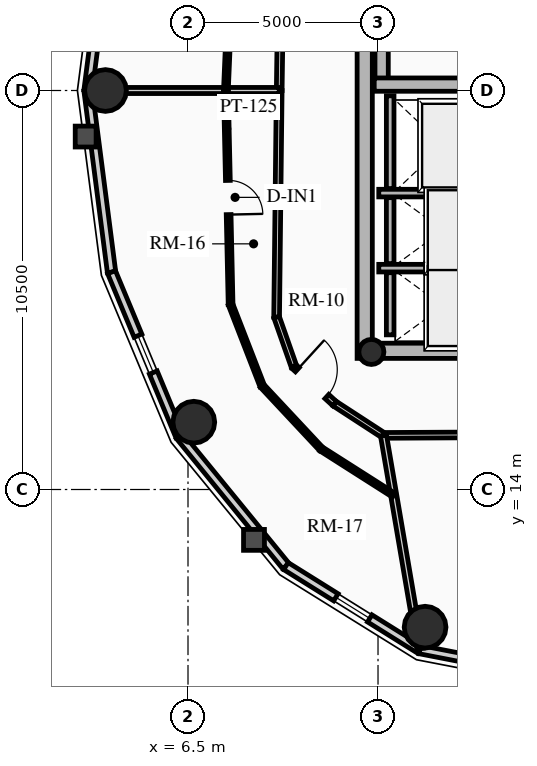
"""IFC4 building model, lengths in metres.
Left out: names, types, materials, properties, quantities, classifications, styles, units other than length and angle.
Written with IfcOpenShell. Run it as: python <this file> out.ifc"""

import sys

from ifc_helpers import new_model, si_unit, direction, frame, frame_2d, origin, origin_2d, place, context, subcontext, project, spatial, rectangle, circle, hollow_circle, extrude, source, transform, mapped, element, fill, save


model = new_model("IFC4")
c1 = context("Model", 3, precision=1e-05, world=origin(), true_north=direction((0.0, 1.0)))
c2 = subcontext(c1, "Body", "Model", "MODEL_VIEW")
j1 = project(units=[si_unit("LENGTHUNIT", "METRE"), si_unit("PLANEANGLEUNIT", "RADIAN")], contexts=[c1])
p1 = place(None, origin())
s1 = spatial("IfcSite", under=j1, at=p1, CompositionType="ELEMENT")
p2 = place(p1, origin())
s2 = spatial("IfcBuilding", under=s1, at=p2, CompositionType="ELEMENT")
p3 = place(p2, frame((0.0, 0.0, 222.85)))
s3 = spatial("IfcBuildingStorey", under=s2, at=p3, CompositionType="ELEMENT", Elevation=222.85)
p4 = place(p3, frame((11.15, 17.45, 0.0), z_axis=(0.0, 0.0, 1.0), x_axis=(0.0, 1.0, 0.0)))
e1 = element("IfcWall", 1, at=p4, inside=s3, PredefinedType="SHEAR", context=c2, shape_type="SweptSolid", body=[
    extrude(rectangle(XDim=14.1, YDim=0.4, at=frame_2d((7.05, 0.0))), origin(), (0.0, 0.0, 1.0), 3.2),
])
p5 = place(p3, frame((11.15, 17.65, 0.0), z_axis=(0.0, 0.0, 1.0), x_axis=(1.0, 0.0, 0.0)))
e2 = element("IfcWall", 2, at=p5, inside=s3, PredefinedType="SHEAR", context=c2, shape_type="SweptSolid", body=[
    extrude(rectangle(XDim=10.7, YDim=0.4, at=frame_2d((5.35, 0.0))), origin(), (0.0, 0.0, 1.0), 3.2),
])
m1 = source(origin(), c2, "Body", "SweptSolid", [
    extrude(rectangle(XDim=1.5, YDim=2.02, at=frame_2d((0.75, 1.01))), frame((0.0, 0.21, 0.0), z_axis=(0.0, -1.0, 0.0), x_axis=(1.0, 0.0, 0.0)), (0.0, 0.0, 1.0), 0.42),
])
p6 = place(p5, frame((5.45, 0.0, 0.0)))
e3 = element("IfcOpeningElement", 3, at=p6, cuts=e2, PredefinedType="OPENING", context=c2, shape_type="MappedRepresentation", body=[
    mapped(m1, transform((0.0, 0.0, 0.0), x_axis=(1.0, 0.0, 0.0), y_axis=(0.0, 1.0, 0.0), z_axis=(0.0, 0.0, 1.0), scale=1.0)),
])
p7 = place(p3, frame((11.595, 24.655, 0.0), z_axis=(0.0, 0.0, 1.0), x_axis=(0.0, 1.0, 0.0)))
e4 = element("IfcWall", 4, at=p7, inside=s3, PredefinedType="SHEAR", context=c2, shape_type="SweptSolid", body=[
    extrude(rectangle(XDim=6.695, YDim=0.35, at=frame_2d((3.348, 0.0))), origin(), (0.0, 0.0, 1.0), 3.2),
])
p8 = place(p3, frame((11.4, 24.655, 0.0), z_axis=(0.0, 0.0, 1.0), x_axis=(1.0, 0.0, 0.0)))
e5 = element("IfcWall", 5, at=p8, inside=s3, PredefinedType="SHEAR", context=c2, shape_type="SweptSolid", body=[
    extrude(rectangle(XDim=3.285, YDim=0.35, at=frame_2d((1.643, 0.0))), origin(), (0.0, 0.0, 1.0), 3.2),
])
p9 = place(p3, frame((11.325, 17.62, 0.0), z_axis=(0.0, 0.0, 1.0), x_axis=(1.0, 0.0, 0.0)))
e6 = element("IfcColumn", 6, at=p9, inside=s3, PredefinedType="COLUMN", context=c2, shape_type="SweptSolid", body=[
    extrude(hollow_circle(Radius=0.33, WallThickness=0.025, at=origin_2d()), origin(), (0.0, 0.0, 1.0), 3.2),
])
for number, where, z_axis, x_axis in (
    (7, (4.328, 24.5, 0.0), (0.0, 0.0, 1.0), (1.0, 0.0, 0.0)),
    (8, (6.653, 15.771, 0.0), (0.0, 0.0, 1.0), (1.0, 0.0, 0.0)),
    (9, (12.739, 10.377, 0.0), (0.0, 0.0, 1.0), (1.0, 0.0, 0.0)),
):
    element("IfcColumn", number, at=place(p3, frame(where, z_axis=z_axis, x_axis=x_axis)), inside=s3, PredefinedType="USERDEFINED", context=c2, shape_type="SweptSolid", body=[
        extrude(circle(Radius=0.55, at=origin_2d()), origin(), (0.0, 0.0, 1.0), 3.2),
    ])
p10 = place(p3, frame((3.87, 24.5, 0.0), z_axis=(0.0, 0.0, 1.0), x_axis=(0.128241318541, 0.991742993027, 0.0)))
e10 = element("IfcWall", 10, at=p10, inside=s3, PredefinedType="SOLIDWALL", context=c2, shape_type="SweptSolid", body=[
    extrude(rectangle(XDim=4.82, YDim=0.22, at=frame_2d((2.41, 0.0))), origin(), (0.0, 0.0, 1.0), 2.612),
])
m2 = source(origin(), c2, "Body", "SweptSolid", [
    extrude(rectangle(XDim=1.05, YDim=1.3, at=frame_2d((0.525, 0.65))), frame((0.0, 0.12, 0.0), z_axis=(0.0, -1.0, 0.0), x_axis=(1.0, 0.0, 0.0)), (0.0, 0.0, 1.0), 0.24),
])
p11 = place(p10, frame((1.885, 0.0, 0.65)))
e11 = element("IfcOpeningElement", 11, at=p11, cuts=e10, PredefinedType="OPENING", context=c2, shape_type="MappedRepresentation", body=[
    mapped(m2, transform((0.0, 0.0, 0.0), x_axis=(1.0, 0.0, 0.0), y_axis=(0.0, 1.0, 0.0), z_axis=(0.0, 0.0, 1.0), scale=1.0)),
])
p12 = place(p3, frame((4.488, 19.719, 0.0), z_axis=(0.0, 0.0, 1.0), x_axis=(-0.128241318541, 0.991742993027, 0.0)))
e12 = element("IfcWall", 12, at=p12, inside=s3, PredefinedType="SOLIDWALL", context=c2, shape_type="SweptSolid", body=[
    extrude(rectangle(XDim=4.82, YDim=0.22, at=frame_2d((2.41, 0.0))), origin(), (0.0, 0.0, 1.0), 2.612),
])
p13 = place(p3, frame((6.282, 15.407, 0.0), z_axis=(0.0, 0.0, 1.0), x_axis=(-0.384036305194, 0.923317993052, 0.0)))
e13 = element("IfcWall", 13, at=p13, inside=s3, PredefinedType="SOLIDWALL", context=c2, shape_type="SweptSolid", body=[
    extrude(rectangle(XDim=4.671, YDim=0.22, at=frame_2d((2.335, 0.0))), origin(), (0.0, 0.0, 1.0), 2.612),
])
p14 = place(p13, frame((1.81, 0.0, 0.65)))
e14 = element("IfcOpeningElement", 14, at=p14, cuts=e13, PredefinedType="OPENING", context=c2, shape_type="MappedRepresentation", body=[
    mapped(m2, transform((0.0, 0.0, 0.0), x_axis=(1.0, 0.0, 0.0), y_axis=(0.0, 1.0, 0.0), z_axis=(0.0, 0.0, 1.0), scale=1.0)),
])
p15 = place(p3, frame((9.076, 11.985, 0.0), z_axis=(0.0, 0.0, 1.0), x_axis=(-0.632467166636, 0.774587169483, 0.0)))
e15 = element("IfcWall", 15, at=p15, inside=s3, PredefinedType="SOLIDWALL", context=c2, shape_type="SweptSolid", body=[
    extrude(rectangle(XDim=4.418, YDim=0.22, at=frame_2d((2.209, 0.0))), origin(), (0.0, 0.0, 1.0), 2.612),
])
p16 = place(p3, frame((12.597, 9.787, 0.0), z_axis=(0.0, 0.0, 1.0), x_axis=(-0.848318713376, 0.529485939886, 0.0)))
e16 = element("IfcWall", 16, at=p16, inside=s3, PredefinedType="SOLIDWALL", context=c2, shape_type="SweptSolid", body=[
    extrude(rectangle(XDim=4.15, YDim=0.22, at=frame_2d((2.075, 0.0))), origin(), (0.0, 0.0, 1.0), 2.612),
])
p17 = place(p16, frame((1.55, 0.0, 0.65)))
e17 = element("IfcOpeningElement", 17, at=p17, cuts=e16, PredefinedType="OPENING", context=c2, shape_type="MappedRepresentation", body=[
    mapped(m2, transform((0.0, 0.0, 0.0), x_axis=(1.0, 0.0, 0.0), y_axis=(0.0, 1.0, 0.0), z_axis=(0.0, 0.0, 1.0), scale=1.0)),
])
p18 = place(p3, frame((16.5, 9.03, 0.0), z_axis=(0.0, 0.0, 1.0), x_axis=(-0.981700307484, 0.190432419211, 0.0)))
e18 = element("IfcWall", 18, at=p18, inside=s3, PredefinedType="SOLIDWALL", context=c2, shape_type="SweptSolid", body=[
    extrude(rectangle(XDim=3.976, YDim=0.22, at=frame_2d((1.988, 0.0))), origin(), (0.0, 0.0, 1.0), 2.612),
])
p19 = place(p18, frame((1.463, 0.0, 0.65)))
e19 = element("IfcOpeningElement", 19, at=p19, cuts=e18, PredefinedType="OPENING", context=c2, shape_type="MappedRepresentation", body=[
    mapped(m2, transform((0.0, 0.0, 0.0), x_axis=(1.0, 0.0, 0.0), y_axis=(0.0, 1.0, 0.0), z_axis=(0.0, 0.0, 1.0), scale=1.0)),
])
p20 = place(p3, frame((11.52, 21.8, 0.0), z_axis=(0.0, 0.0, 1.0), x_axis=(1.0, 0.0, 0.0)))
e20 = element("IfcWall", 20, at=p20, inside=s3, PredefinedType="SHEAR", context=c2, shape_type="SweptSolid", body=[
    extrude(rectangle(XDim=2.97, YDim=0.2, at=frame_2d((1.485, 0.0))), origin(), (0.0, 0.0, 1.0), 3.2),
])
p21 = place(p3, frame((11.82, 21.92, 0.0), z_axis=(0.0, 0.0, 1.0), x_axis=(0.0, 1.0, 0.0)))
e21 = element("IfcWall", 21, at=p21, inside=s3, PredefinedType="SHEAR", context=c2, shape_type="SweptSolid", body=[
    extrude(rectangle(XDim=2.44, YDim=0.2, at=frame_2d((1.22, 0.0))), origin(), (0.0, 0.0, 1.0), 3.2),
])
p22 = place(p3, frame((11.52, 19.825, 0.0), z_axis=(0.0, 0.0, 1.0), x_axis=(1.0, 0.0, 0.0)))
e22 = element("IfcWall", 22, at=p22, inside=s3, PredefinedType="SHEAR", context=c2, shape_type="SweptSolid", body=[
    extrude(rectangle(XDim=2.97, YDim=0.2, at=frame_2d((1.485, 0.0))), origin(), (0.0, 0.0, 1.0), 3.2),
])
p23 = place(p3, frame((11.82, 19.945, 0.0), z_axis=(0.0, 0.0, 1.0), x_axis=(0.0, 1.0, 0.0)))
e23 = element("IfcWall", 23, at=p23, inside=s3, PredefinedType="SHEAR", context=c2, shape_type="SweptSolid", body=[
    extrude(rectangle(XDim=1.735, YDim=0.2, at=frame_2d((0.867, 0.0))), origin(), (0.0, 0.0, 1.0), 3.2),
])
p24 = place(p3, frame((11.82, 18.07, 0.0), z_axis=(0.0, 0.0, 1.0), x_axis=(0.0, 1.0, 0.0)))
e24 = element("IfcWall", 24, at=p24, inside=s3, PredefinedType="SHEAR", context=c2, shape_type="SweptSolid", body=[
    extrude(rectangle(XDim=1.635, YDim=0.2, at=frame_2d((0.817, 0.0))), origin(), (0.0, 0.0, 1.0), 3.2),
])
p25 = place(p3, frame((8.986, 30.349, 0.0), z_axis=(0.0, 0.0, 1.0), x_axis=(-0.014775478218, -0.999890836663, 0.0)))
e25 = element("IfcWall", 25, at=p25, inside=s3, PredefinedType="PARTITIONING", context=c2, shape_type="SweptSolid", body=[
    extrude(rectangle(XDim=5.849, YDim=0.15, at=frame_2d((2.925, 0.0))), origin(), (0.0, 0.0, 1.0), 2.975),
])
p26 = place(p3, frame((8.9, 24.5, 0.0), z_axis=(0.0, 0.0, 1.0), x_axis=(-0.011416369353, -0.999934831132, 0.0)))
e26 = element("IfcWall", 26, at=p26, inside=s3, PredefinedType="PARTITIONING", context=c2, shape_type="SweptSolid", body=[
    extrude(rectangle(XDim=5.967, YDim=0.15, at=frame_2d((2.983, 0.0))), origin(), (0.0, 0.0, 1.0), 2.612),
])
p27 = place(p3, frame((8.832, 18.534, 0.0), z_axis=(0.0, 0.0, 1.0), x_axis=(0.332031819657, -0.943268186008, 0.0)))
e27 = element("IfcWall", 27, at=p27, inside=s3, PredefinedType="PARTITIONING", context=c2, shape_type="SweptSolid", body=[
    extrude(rectangle(XDim=1.377, YDim=0.15, at=frame_2d((0.688, 0.0))), origin(), (0.0, 0.0, 1.0), 2.545),
])
p28 = place(p3, frame((9.289, 17.235, 0.0), z_axis=(0.0, 0.0, 1.0), x_axis=(0.739015164946, -0.673688790155, 0.0)))
e28 = element("IfcWall", 28, at=p28, inside=s3, PredefinedType="PARTITIONING", context=c2, shape_type="SweptSolid", body=[
    extrude(rectangle(XDim=1.446, YDim=0.15, at=frame_2d((0.723, 0.0))), origin(), (0.0, 0.0, 1.0), 2.612),
])
m3 = source(origin(), c2, "Body", "SweptSolid", [
    extrude(rectangle(XDim=1.05, YDim=2.015, at=frame_2d((0.525, 1.007))), frame((0.0, 0.085, 0.0), z_axis=(0.0, -1.0, 0.0), x_axis=(1.0, 0.0, 0.0)), (0.0, 0.0, 1.0), 0.17),
])
p29 = place(p28, frame((0.12, 0.0, 0.0)))
e29 = element("IfcOpeningElement", 29, at=p29, cuts=e28, PredefinedType="OPENING", context=c2, shape_type="MappedRepresentation", body=[
    mapped(m3, transform((0.0, 0.0, 0.0), x_axis=(1.0, 0.0, 0.0), y_axis=(0.0, 1.0, 0.0), z_axis=(0.0, 0.0, 1.0), scale=1.0)),
])
p30 = place(p3, frame((10.358, 16.26, 0.0), z_axis=(0.0, 0.0, 1.0), x_axis=(0.838265397059, -0.545262435983, 0.0)))
e30 = element("IfcWall", 30, at=p30, inside=s3, PredefinedType="PARTITIONING", context=c2, shape_type="SweptSolid", body=[
    extrude(rectangle(XDim=1.534, YDim=0.15, at=frame_2d((0.767, 0.0))), origin(), (0.0, 0.0, 1.0), 2.545),
])
p31 = place(p3, frame((11.644, 15.424, 0.0), z_axis=(0.0, 0.0, 1.0), x_axis=(0.999986552511, 0.005186019339, 0.0)))
e31 = element("IfcWall", 31, at=p31, inside=s3, PredefinedType="PARTITIONING", context=c2, shape_type="SweptSolid", body=[
    extrude(rectangle(XDim=3.201, YDim=0.15, at=frame_2d((1.601, 0.0))), origin(), (0.0, 0.0, 1.0), 2.612),
])
p32 = place(p3, frame((8.9, 24.5, 0.0), z_axis=(0.0, 0.0, 1.0), x_axis=(-1.0, 0.0, 0.0)))
e32 = element("IfcWall", 32, at=p32, inside=s3, PredefinedType="PARTITIONING", context=c2, shape_type="SweptSolid", body=[
    extrude(rectangle(XDim=5.01, YDim=0.16, at=frame_2d((2.505, 0.0))), origin(), (0.0, 0.0, 1.0), 2.612),
])
p33 = place(p3, frame((11.644, 15.424, 0.0), z_axis=(0.0, 0.0, 1.0), x_axis=(0.168350269159, -0.985727237563, 0.0)))
e33 = element("IfcWall", 33, at=p33, inside=s3, PredefinedType="PARTITIONING", context=c2, shape_type="SweptSolid", body=[
    extrude(rectangle(XDim=5.699, YDim=0.16, at=frame_2d((2.85, 0.0))), origin(), (0.0, 0.0, 1.0), 2.612),
])
p34 = place(p3, frame((7.732, 30.048, 0.0), z_axis=(0.0, 0.0, 1.0), x_axis=(-0.042296211955, -0.999105114817, 0.0)))
e34 = element("IfcWall", 34, at=p34, inside=s3, PredefinedType="PARTITIONING", context=c2, shape_type="SweptSolid", body=[
    extrude(rectangle(XDim=5.553, YDim=0.125, at=frame_2d((2.776, 0.0))), origin(), (0.0, 0.0, 1.0), 2.975),
])
m4 = source(origin(), c2, "Body", "SweptSolid", [
    extrude(rectangle(XDim=0.9, YDim=2.005, at=frame_2d((0.45, 1.002))), frame((0.0, 0.073, 0.0), z_axis=(0.0, -1.0, 0.0), x_axis=(1.0, 0.0, 0.0)), (0.0, 0.0, 1.0), 0.145),
])
p35 = place(p34, frame((2.326, 0.0, 0.0)))
e35 = element("IfcOpeningElement", 35, at=p35, cuts=e34, PredefinedType="OPENING", context=c2, shape_type="MappedRepresentation", body=[
    mapped(m4, transform((0.0, 0.0, 0.0), x_axis=(1.0, 0.0, 0.0), y_axis=(0.0, 1.0, 0.0), z_axis=(0.0, 0.0, 1.0), scale=1.0)),
])
p36 = place(p3, frame((7.497, 24.5, 0.0), z_axis=(0.0, 0.0, 1.0), x_axis=(0.021927972859, -0.999759553096, 0.0)))
e36 = element("IfcWall", 36, at=p36, inside=s3, PredefinedType="PARTITIONING", context=c2, shape_type="SweptSolid", body=[
    extrude(rectangle(XDim=5.634, YDim=0.125, at=frame_2d((2.817, 0.0))), origin(), (0.0, 0.0, 1.0), 2.612),
])
p37 = place(p36, frame((2.367, 0.0, 0.0)))
e37 = element("IfcOpeningElement", 37, at=p37, cuts=e36, PredefinedType="OPENING", context=c2, shape_type="MappedRepresentation", body=[
    mapped(m4, transform((0.0, 0.0, 0.0), x_axis=(1.0, 0.0, 0.0), y_axis=(0.0, 1.0, 0.0), z_axis=(0.0, 0.0, 1.0), scale=1.0)),
])
p38 = place(p3, frame((7.621, 18.868, 0.0), z_axis=(0.0, 0.0, 1.0), x_axis=(0.361712646649, -0.93228963378, 0.0)))
e38 = element("IfcWall", 38, at=p38, inside=s3, PredefinedType="PARTITIONING", context=c2, shape_type="SweptSolid", body=[
    extrude(rectangle(XDim=2.297, YDim=0.125, at=frame_2d((1.148, 0.0))), origin(), (0.0, 0.0, 1.0), 2.545),
])
p39 = place(p3, frame((8.452, 16.726, 0.0), z_axis=(0.0, 0.0, 1.0), x_axis=(0.68299988274, -0.730418482911, 0.0)))
e39 = element("IfcWall", 39, at=p39, inside=s3, PredefinedType="PARTITIONING", context=c2, shape_type="SweptSolid", body=[
    extrude(rectangle(XDim=2.271, YDim=0.125, at=frame_2d((1.135, 0.0))), origin(), (0.0, 0.0, 1.0), 2.612),
])
p40 = place(p3, frame((10.002, 15.068, 0.0), z_axis=(0.0, 0.0, 1.0), x_axis=(0.843381706724, -0.537314895349, 0.0)))
e40 = element("IfcWall", 40, at=p40, inside=s3, PredefinedType="PARTITIONING", context=c2, shape_type="SweptSolid", body=[
    extrude(rectangle(XDim=2.265, YDim=0.125, at=frame_2d((1.132, 0.0))), origin(), (0.0, 0.0, 1.0), 2.545),
])
m5 = source(origin(), c2, "Body", "SweptSolid", [
    extrude(rectangle(XDim=1.05, YDim=1.3, at=frame_2d((0.525, 0.65))), frame((0.0, 0.03, 0.0), z_axis=(0.0, -1.0, 0.0), x_axis=(1.0, 0.0, 0.0)), (0.0, 0.0, 1.0), 0.06),
])
p41 = place(p14, origin())
e41 = element("IfcWindow", 41, at=p41, inside=s3, PartitioningType="SINGLE_PANEL", PredefinedType="WINDOW", context=c2, shape_type="MappedRepresentation", body=[
    mapped(m5, transform((0.0, 0.0, 0.0), x_axis=(1.0, 0.0, 0.0), y_axis=(0.0, 1.0, 0.0), z_axis=(0.0, 0.0, 1.0), scale=1.0)),
])
fill(e14, e41)
p42 = place(p17, origin())
e42 = element("IfcWindow", 42, at=p42, inside=s3, PartitioningType="SINGLE_PANEL", PredefinedType="WINDOW", context=c2, shape_type="MappedRepresentation", body=[
    mapped(m5, transform((0.0, 0.0, 0.0), x_axis=(1.0, 0.0, 0.0), y_axis=(0.0, 1.0, 0.0), z_axis=(0.0, 0.0, 1.0), scale=1.0)),
])
fill(e17, e42)
m6 = source(origin(), c2, "Body", "SweptSolid", [
    extrude(rectangle(XDim=1.05, YDim=2.015, at=frame_2d((0.525, 1.007))), frame((0.0, 0.025, 0.0), z_axis=(0.0, -1.0, 0.0), x_axis=(1.0, 0.0, 0.0)), (0.0, 0.0, 1.0), 0.05),
])
p43 = place(p29, origin())
e43 = element("IfcDoor", 43, at=p43, inside=s3, OperationType="SINGLE_SWING_LEFT", PredefinedType="DOOR", context=c2, shape_type="MappedRepresentation", body=[
    mapped(m6, transform((0.0, 0.0, 0.0), x_axis=(1.0, 0.0, 0.0), y_axis=(0.0, 1.0, 0.0), z_axis=(0.0, 0.0, 1.0), scale=1.0)),
])
fill(e29, e43)
m7 = source(origin(), c2, "Body", "SweptSolid", [
    extrude(rectangle(XDim=0.9, YDim=2.005, at=frame_2d((0.45, 1.002))), frame((0.0, 0.025, 0.0), z_axis=(0.0, -1.0, 0.0), x_axis=(1.0, 0.0, 0.0)), (0.0, 0.0, 1.0), 0.05),
])
p44 = place(p37, origin())
e44 = element("IfcDoor", 44, at=p44, inside=s3, OperationType="SINGLE_SWING_RIGHT", PredefinedType="DOOR", context=c2, shape_type="MappedRepresentation", body=[
    mapped(m7, transform((0.0, 0.0, 0.0), x_axis=(1.0, 0.0, 0.0), y_axis=(0.0, 1.0, 0.0), z_axis=(0.0, 0.0, 1.0), scale=1.0)),
])
fill(e37, e44)
save(model, sys.argv[1])
